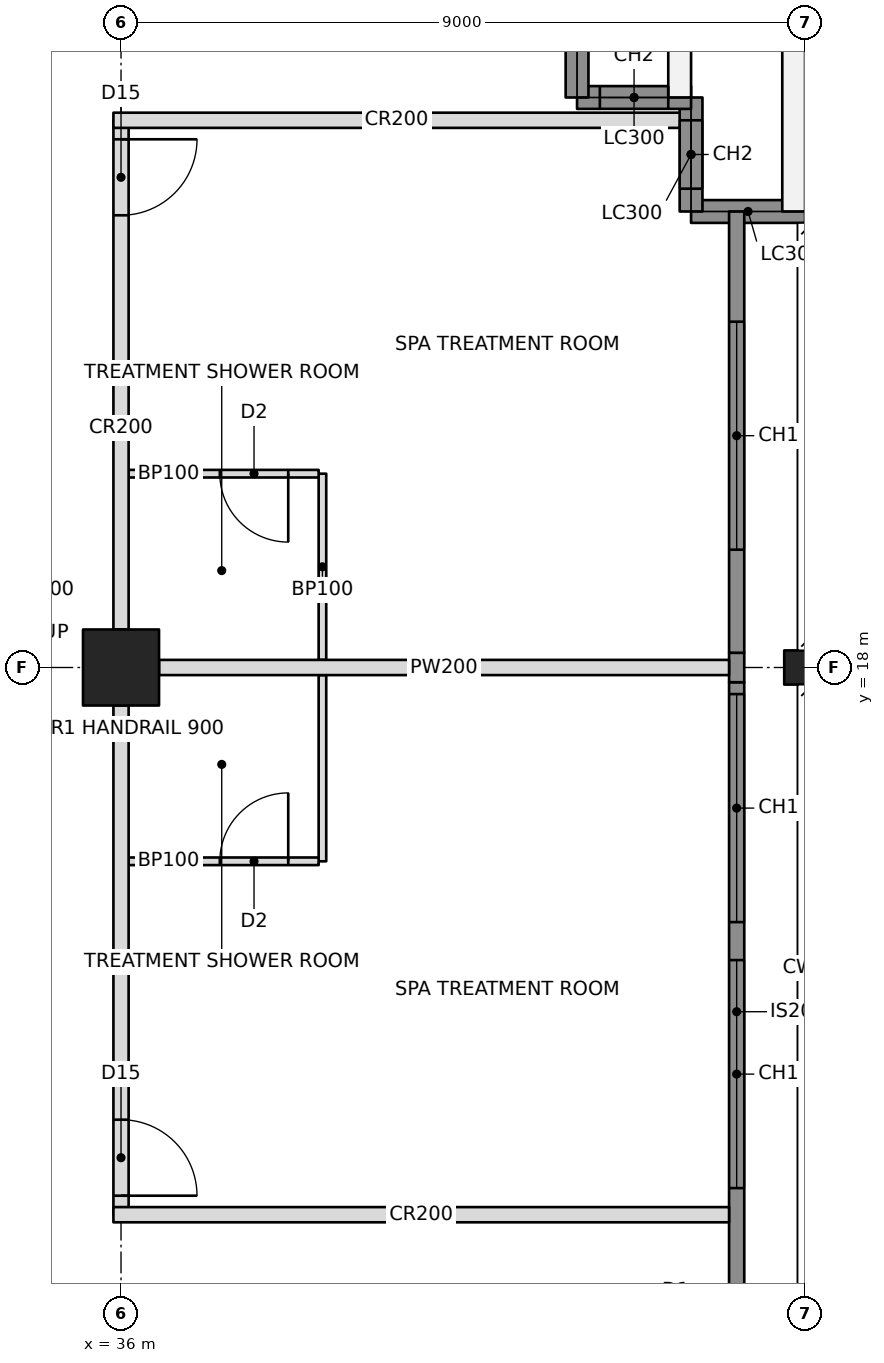
"""IFC4 building model, lengths in metres.
Left out: names, types, materials, properties, quantities, classifications, styles, units other than length and angle.
Written with IfcOpenShell. Run it as: python <this file> out.ifc"""

import sys

from ifc_helpers import new_model, si_unit, direction, frame, frame_2d, origin, origin_2d, place, context, subcontext, project, spatial, rectangle, hollow_rectangle, i_section, extrude, element, fill, save


model = new_model("IFC4")
c1 = context("Model", 3, precision=1e-05, world=origin(), true_north=direction((0.0, 1.0)))
c2 = subcontext(c1, "Body", "Model", "MODEL_VIEW")
j1 = project(units=[si_unit("LENGTHUNIT", "METRE"), si_unit("PLANEANGLEUNIT", "RADIAN")], contexts=[c1])
p1 = place(None, origin())
s1 = spatial("IfcSite", under=j1, at=p1, CompositionType="ELEMENT")
p2 = place(p1, origin())
s2 = spatial("IfcBuilding", under=s1, at=p2, CompositionType="ELEMENT")
p3 = place(p2, frame((0.0, 0.0, 160.4)))
s3 = spatial("IfcBuildingStorey", under=s2, at=p3, CompositionType="ELEMENT", Elevation=160.4)
p4 = place(p3, frame((36.0, 18.0, 0.0), z_axis=(0.0, 0.0, 1.0), x_axis=(0.0, 1.0, 0.0)))
e1 = element("IfcColumn", 1, at=p4, inside=s3, PredefinedType="COLUMN", context=c2, shape_type="SweptSolid", body=[
    extrude(hollow_rectangle(XDim=1.0, YDim=1.0, WallThickness=0.1, at=origin_2d()), origin(), (0.0, 0.0, 1.0), 3.4),
])
p5 = place(p3, frame((45.0, 18.0, 0.0), z_axis=(0.0, 0.0, 1.0), x_axis=(0.0, 1.0, 0.0)))
e2 = element("IfcColumn", 2, at=p5, inside=s3, PredefinedType="COLUMN", context=c2, shape_type="SweptSolid", body=[
    extrude(i_section(OverallWidth=0.449, OverallDepth=0.549, WebThickness=0.072, FlangeThickness=0.115, at=origin_2d()), origin(), (0.0, 0.0, 1.0), 3.4),
])
p6 = place(p3, frame((45.0, 24.0, 0.0), z_axis=(0.0, 0.0, 1.0), x_axis=(-1.0, 0.0, 0.0)))
e3 = element("IfcWall", 3, at=p6, inside=s3, PredefinedType="SOLIDWALL", context=c2, shape_type="SweptSolid", body=[
    extrude(rectangle(XDim=1.5, YDim=0.3, at=frame_2d((0.75, 0.0))), origin(), (0.0, 0.0, 1.0), 2.42),
])
p7 = place(p3, frame((43.5, 24.0, 0.0), z_axis=(0.0, 0.0, 1.0), x_axis=(0.0, 1.0, 0.0)))
e4 = element("IfcWall", 4, at=p7, inside=s3, PredefinedType="SOLIDWALL", context=c2, shape_type="SweptSolid", body=[
    extrude(rectangle(XDim=1.5, YDim=0.3, at=frame_2d((0.75, 0.0))), origin(), (0.0, 0.0, 1.0), 3.2),
])
p8 = place(p7, frame((0.3, 0.0, 0.6)))
e5 = element("IfcOpeningElement", 5, at=p8, cuts=e4, PredefinedType="OPENING", context=c2, shape_type="SweptSolid", body=[
    extrude(rectangle(XDim=0.9, YDim=2.2, at=frame_2d((0.45, 1.1))), frame((0.0, 0.16, 0.0), z_axis=(0.0, -1.0, 0.0), x_axis=(1.0, 0.0, 0.0)), (0.0, 0.0, 1.0), 0.32),
])
p9 = place(p3, frame((43.5, 25.5, 0.0), z_axis=(0.0, 0.0, 1.0), x_axis=(-1.0, 0.0, 0.0)))
e6 = element("IfcWall", 6, at=p9, inside=s3, PredefinedType="SOLIDWALL", context=c2, shape_type="SweptSolid", body=[
    extrude(rectangle(XDim=1.5, YDim=0.3, at=frame_2d((0.75, 0.0))), origin(), (0.0, 0.0, 1.0), 3.2),
])
p10 = place(p9, frame((0.3, 0.0, 0.6)))
e7 = element("IfcOpeningElement", 7, at=p10, cuts=e6, PredefinedType="OPENING", context=c2, shape_type="SweptSolid", body=[
    extrude(rectangle(XDim=0.9, YDim=2.2, at=frame_2d((0.45, 1.1))), frame((0.0, 0.16, 0.0), z_axis=(0.0, -1.0, 0.0), x_axis=(1.0, 0.0, 0.0)), (0.0, 0.0, 1.0), 0.32),
])
p11 = place(p3, frame((42.0, 25.5, 0.0), z_axis=(0.0, 0.0, 1.0), x_axis=(0.0, 1.0, 0.0)))
e8 = element("IfcWall", 8, at=p11, inside=s3, PredefinedType="SOLIDWALL", context=c2, shape_type="SweptSolid", body=[
    extrude(rectangle(XDim=1.5, YDim=0.3, at=frame_2d((0.75, 0.0))), origin(), (0.0, 0.0, 1.0), 2.42),
])
p12 = place(p3, frame((43.35, 27.0, 0.0), z_axis=(0.0, 0.0, 1.0), x_axis=(0.0, -1.0, 0.0)))
e9 = element("IfcWall", 9, at=p12, inside=s3, PredefinedType="PARAPET", context=c2, shape_type="SweptSolid", body=[
    extrude(rectangle(XDim=1.5, YDim=0.3, at=frame_2d((0.75, 0.0))), origin(), (0.0, 0.0, 1.0), 1.1),
])
p13 = place(p3, frame((44.85, 26.6, 0.0), z_axis=(0.0, 0.0, 1.0), x_axis=(0.0, -1.0, 0.0)))
e10 = element("IfcWall", 10, at=p13, inside=s3, PredefinedType="PARAPET", context=c2, shape_type="SweptSolid", body=[
    extrude(rectangle(XDim=2.6, YDim=0.3, at=frame_2d((1.3, 0.0))), origin(), (0.0, 0.0, 1.0), 1.1),
])
p14 = place(p3, frame((36.0, 10.8, 0.0), z_axis=(0.0, 0.0, 1.0), x_axis=(0.0, 1.0, 0.0)))
e11 = element("IfcWall", 11, at=p14, inside=s3, PredefinedType="PARTITIONING", context=c2, shape_type="SweptSolid", body=[
    extrude(rectangle(XDim=6.7, YDim=0.2, at=frame_2d((3.35, 0.0))), origin(), (0.0, 0.0, 1.0), 2.405),
])
p15 = place(p14, frame((0.25, 0.0, 0.0)))
e12 = element("IfcOpeningElement", 12, at=p15, cuts=e11, PredefinedType="OPENING", context=c2, shape_type="SweptSolid", body=[
    extrude(rectangle(XDim=1.0, YDim=2.1, at=frame_2d((0.5, 1.05))), frame((0.0, 0.11, 0.0), z_axis=(0.0, -1.0, 0.0), x_axis=(1.0, 0.0, 0.0)), (0.0, 0.0, 1.0), 0.22),
])
p16 = place(p3, frame((36.0, 18.5, 0.0), z_axis=(0.0, 0.0, 1.0), x_axis=(0.0, 1.0, 0.0)))
e13 = element("IfcWall", 13, at=p16, inside=s3, PredefinedType="PARTITIONING", context=c2, shape_type="SweptSolid", body=[
    extrude(rectangle(XDim=6.7, YDim=0.2, at=frame_2d((3.35, 0.0))), origin(), (0.0, 0.0, 1.0), 2.405),
])
p17 = place(p16, frame((5.45, 0.0, 0.0)))
e14 = element("IfcOpeningElement", 14, at=p17, cuts=e13, PredefinedType="OPENING", context=c2, shape_type="SweptSolid", body=[
    extrude(rectangle(XDim=1.0, YDim=2.1, at=frame_2d((0.5, 1.05))), frame((0.0, 0.11, 0.0), z_axis=(0.0, -1.0, 0.0), x_axis=(1.0, 0.0, 0.0)), (0.0, 0.0, 1.0), 0.22),
])
p18 = place(p3, frame((35.9, 10.8, 0.0), z_axis=(0.0, 0.0, 1.0), x_axis=(1.0, 0.0, 0.0)))
e15 = element("IfcWall", 15, at=p18, inside=s3, PredefinedType="PARTITIONING", context=c2, shape_type="SweptSolid", body=[
    extrude(rectangle(XDim=8.1, YDim=0.2, at=frame_2d((4.05, 0.0))), origin(), (0.0, 0.0, 1.0), 2.404),
])
p19 = place(p3, frame((35.9, 25.2, 0.0), z_axis=(0.0, 0.0, 1.0), x_axis=(1.0, 0.0, 0.0)))
e16 = element("IfcWall", 16, at=p19, inside=s3, PredefinedType="PARTITIONING", context=c2, shape_type="SweptSolid", body=[
    extrude(rectangle(XDim=7.45, YDim=0.2, at=frame_2d((3.725, 0.0))), origin(), (0.0, 0.0, 1.0), 2.404),
])
p20 = place(p3, frame((36.5, 18.0, 0.0), z_axis=(0.0, 0.0, 1.0), x_axis=(1.0, 0.0, 0.0)))
e17 = element("IfcWall", 17, at=p20, inside=s3, PredefinedType="PARTITIONING", context=c2, shape_type="SweptSolid", body=[
    extrude(rectangle(XDim=7.5, YDim=0.2, at=frame_2d((3.75, 0.0))), origin(), (0.0, 0.0, 1.0), 2.405),
])
p21 = place(p3, frame((38.65, 15.45, 0.0), z_axis=(0.0, 0.0, 1.0), x_axis=(0.0, 1.0, 0.0)))
e18 = element("IfcWall", 18, at=p21, inside=s3, PredefinedType="PARTITIONING", context=c2, shape_type="SweptSolid", body=[
    extrude(rectangle(XDim=2.45, YDim=0.1, at=frame_2d((1.225, 0.0))), origin(), (0.0, 0.0, 1.0), 2.404),
])
p22 = place(p3, frame((36.1, 15.45, 0.0), z_axis=(0.0, 0.0, 1.0), x_axis=(1.0, 0.0, 0.0)))
e19 = element("IfcWall", 19, at=p22, inside=s3, PredefinedType="PARTITIONING", context=c2, shape_type="SweptSolid", body=[
    extrude(rectangle(XDim=2.5, YDim=0.1, at=frame_2d((1.25, 0.0))), origin(), (0.0, 0.0, 1.0), 2.404),
])
p23 = place(p22, frame((1.2, 0.0, 0.0)))
e20 = element("IfcOpeningElement", 20, at=p23, cuts=e19, PredefinedType="OPENING", context=c2, shape_type="SweptSolid", body=[
    extrude(rectangle(XDim=0.9, YDim=2.1, at=frame_2d((0.45, 1.05))), frame((0.0, 0.06, 0.0), z_axis=(0.0, -1.0, 0.0), x_axis=(1.0, 0.0, 0.0)), (0.0, 0.0, 1.0), 0.12),
])
p24 = place(p3, frame((38.65, 18.1, 0.0), z_axis=(0.0, 0.0, 1.0), x_axis=(0.0, 1.0, 0.0)))
e21 = element("IfcWall", 21, at=p24, inside=s3, PredefinedType="PARTITIONING", context=c2, shape_type="SweptSolid", body=[
    extrude(rectangle(XDim=2.45, YDim=0.1, at=frame_2d((1.225, 0.0))), origin(), (0.0, 0.0, 1.0), 2.404),
])
p25 = place(p3, frame((36.1, 20.55, 0.0), z_axis=(0.0, 0.0, 1.0), x_axis=(1.0, 0.0, 0.0)))
e22 = element("IfcWall", 22, at=p25, inside=s3, PredefinedType="PARTITIONING", context=c2, shape_type="SweptSolid", body=[
    extrude(rectangle(XDim=2.5, YDim=0.1, at=frame_2d((1.25, 0.0))), origin(), (0.0, 0.0, 1.0), 2.404),
])
p26 = place(p25, frame((1.2, 0.0, 0.0)))
e23 = element("IfcOpeningElement", 23, at=p26, cuts=e22, PredefinedType="OPENING", context=c2, shape_type="SweptSolid", body=[
    extrude(rectangle(XDim=0.9, YDim=2.1, at=frame_2d((0.45, 1.05))), frame((0.0, 0.06, 0.0), z_axis=(0.0, -1.0, 0.0), x_axis=(1.0, 0.0, 0.0)), (0.0, 0.0, 1.0), 0.12),
])
p27 = place(p3, frame((44.1, 9.135, 0.0), z_axis=(0.0, 0.0, 1.0), x_axis=(0.0, 1.0, 0.0)))
e24 = element("IfcWall", 24, at=p27, inside=s3, PredefinedType="SOLIDWALL", context=c2, shape_type="SweptSolid", body=[
    extrude(rectangle(XDim=8.671, YDim=0.2, at=frame_2d((4.335, 0.0))), origin(), (0.0, 0.0, 1.0), 3.2),
])
p28 = place(p27, frame((2.015, 0.0, 0.6)))
e25 = element("IfcOpeningElement", 25, at=p28, cuts=e24, PredefinedType="OPENING", context=c2, shape_type="SweptSolid", body=[
    extrude(rectangle(XDim=3.0, YDim=2.2, at=frame_2d((1.5, 1.1))), frame((0.0, 0.11, 0.0), z_axis=(0.0, -1.0, 0.0), x_axis=(1.0, 0.0, 0.0)), (0.0, 0.0, 1.0), 0.22),
])
p29 = place(p27, frame((5.515, 0.0, 0.6)))
e26 = element("IfcOpeningElement", 26, at=p29, cuts=e24, PredefinedType="OPENING", context=c2, shape_type="SweptSolid", body=[
    extrude(rectangle(XDim=3.0, YDim=2.2, at=frame_2d((1.5, 1.1))), frame((0.0, 0.11, 0.0), z_axis=(0.0, -1.0, 0.0), x_axis=(1.0, 0.0, 0.0)), (0.0, 0.0, 1.0), 0.22),
])
p30 = place(p3, frame((44.1, 17.806, 0.0), z_axis=(0.0, 0.0, 1.0), x_axis=(0.0, 1.0, 0.0)))
e27 = element("IfcWall", 27, at=p30, inside=s3, PredefinedType="SOLIDWALL", context=c2, shape_type="SweptSolid", body=[
    extrude(rectangle(XDim=0.388, YDim=0.2, at=frame_2d((0.194, 0.0))), origin(), (0.0, 0.0, 1.0), 2.404),
])
p31 = place(p3, frame((44.1, 18.194, 0.0), z_axis=(0.0, 0.0, 1.0), x_axis=(0.0, 1.0, 0.0)))
e28 = element("IfcWall", 28, at=p31, inside=s3, PredefinedType="SOLIDWALL", context=c2, shape_type="SweptSolid", body=[
    extrude(rectangle(XDim=5.806, YDim=0.2, at=frame_2d((2.903, 0.0))), origin(), (0.0, 0.0, 1.0), 3.2),
])
p32 = place(p31, frame((1.356, 0.0, 0.6)))
e29 = element("IfcOpeningElement", 29, at=p32, cuts=e28, PredefinedType="OPENING", context=c2, shape_type="SweptSolid", body=[
    extrude(rectangle(XDim=3.0, YDim=2.2, at=frame_2d((1.5, 1.1))), frame((0.0, 0.11, 0.0), z_axis=(0.0, -1.0, 0.0), x_axis=(1.0, 0.0, 0.0)), (0.0, 0.0, 1.0), 0.22),
])
p33 = place(p8, origin())
e30 = element("IfcWindow", 30, at=p33, inside=s3, PartitioningType="SINGLE_PANEL", PredefinedType="WINDOW", context=c2, shape_type="SweptSolid", body=[
    extrude(rectangle(XDim=0.9, YDim=2.2, at=frame_2d((0.45, 1.1))), frame((0.0, 0.03, 0.0), z_axis=(0.0, -1.0, 0.0), x_axis=(1.0, 0.0, 0.0)), (0.0, 0.0, 1.0), 0.06),
])
fill(e5, e30)
p34 = place(p10, origin())
e31 = element("IfcWindow", 31, at=p34, inside=s3, PartitioningType="SINGLE_PANEL", PredefinedType="WINDOW", context=c2, shape_type="SweptSolid", body=[
    extrude(rectangle(XDim=0.9, YDim=2.2, at=frame_2d((0.45, 1.1))), frame((0.0, 0.03, 0.0), z_axis=(0.0, -1.0, 0.0), x_axis=(1.0, 0.0, 0.0)), (0.0, 0.0, 1.0), 0.06),
])
fill(e7, e31)
p35 = place(p28, origin())
e32 = element("IfcWindow", 32, at=p35, inside=s3, PartitioningType="TRIPLE_PANEL_VERTICAL", PredefinedType="WINDOW", context=c2, shape_type="SweptSolid", body=[
    extrude(rectangle(XDim=3.0, YDim=2.2, at=frame_2d((1.5, 1.1))), frame((0.0, 0.03, 0.0), z_axis=(0.0, -1.0, 0.0), x_axis=(1.0, 0.0, 0.0)), (0.0, 0.0, 1.0), 0.06),
])
fill(e25, e32)
p36 = place(p29, origin())
e33 = element("IfcWindow", 33, at=p36, inside=s3, PartitioningType="TRIPLE_PANEL_VERTICAL", PredefinedType="WINDOW", context=c2, shape_type="SweptSolid", body=[
    extrude(rectangle(XDim=3.0, YDim=2.2, at=frame_2d((1.5, 1.1))), frame((0.0, 0.03, 0.0), z_axis=(0.0, -1.0, 0.0), x_axis=(1.0, 0.0, 0.0)), (0.0, 0.0, 1.0), 0.06),
])
fill(e26, e33)
p37 = place(p32, origin())
e34 = element("IfcWindow", 34, at=p37, inside=s3, PartitioningType="TRIPLE_PANEL_VERTICAL", PredefinedType="WINDOW", context=c2, shape_type="SweptSolid", body=[
    extrude(rectangle(XDim=3.0, YDim=2.2, at=frame_2d((1.5, 1.1))), frame((0.0, 0.03, 0.0), z_axis=(0.0, -1.0, 0.0), x_axis=(1.0, 0.0, 0.0)), (0.0, 0.0, 1.0), 0.06),
])
fill(e29, e34)
p38 = place(p23, origin())
e35 = element("IfcDoor", 35, at=p38, inside=s3, OperationType="SINGLE_SWING_RIGHT", PredefinedType="DOOR", context=c2, shape_type="SweptSolid", body=[
    extrude(rectangle(XDim=0.9, YDim=2.1, at=frame_2d((0.45, 1.05))), frame((0.0, 0.025, 0.0), z_axis=(0.0, -1.0, 0.0), x_axis=(1.0, 0.0, 0.0)), (0.0, 0.0, 1.0), 0.05),
])
fill(e20, e35)
p39 = place(p15, frame((1.0, 0.0, 0.0), z_axis=(0.0, 0.0, 1.0), x_axis=(-1.0, 0.0, 0.0)))
e36 = element("IfcDoor", 36, at=p39, inside=s3, OperationType="SINGLE_SWING_RIGHT", PredefinedType="DOOR", context=c2, shape_type="SweptSolid", body=[
    extrude(rectangle(XDim=1.0, YDim=2.1, at=frame_2d((0.5, 1.05))), frame((0.0, 0.025, 0.0), z_axis=(0.0, -1.0, 0.0), x_axis=(1.0, 0.0, 0.0)), (0.0, 0.0, 1.0), 0.05),
])
fill(e12, e36)
p40 = place(p26, frame((0.9, 0.0, 0.0), z_axis=(0.0, 0.0, 1.0), x_axis=(-1.0, 0.0, 0.0)))
e37 = element("IfcDoor", 37, at=p40, inside=s3, OperationType="SINGLE_SWING_LEFT", PredefinedType="DOOR", context=c2, shape_type="SweptSolid", body=[
    extrude(rectangle(XDim=0.9, YDim=2.1, at=frame_2d((0.45, 1.05))), frame((0.0, 0.025, 0.0), z_axis=(0.0, -1.0, 0.0), x_axis=(1.0, 0.0, 0.0)), (0.0, 0.0, 1.0), 0.05),
])
fill(e23, e37)
p41 = place(p17, frame((1.0, 0.0, 0.0), z_axis=(0.0, 0.0, 1.0), x_axis=(-1.0, 0.0, 0.0)))
e38 = element("IfcDoor", 38, at=p41, inside=s3, OperationType="SINGLE_SWING_LEFT", PredefinedType="DOOR", context=c2, shape_type="SweptSolid", body=[
    extrude(rectangle(XDim=1.0, YDim=2.1, at=frame_2d((0.5, 1.05))), frame((0.0, 0.025, 0.0), z_axis=(0.0, -1.0, 0.0), x_axis=(1.0, 0.0, 0.0)), (0.0, 0.0, 1.0), 0.05),
])
fill(e14, e38)
save(model, sys.argv[1])
